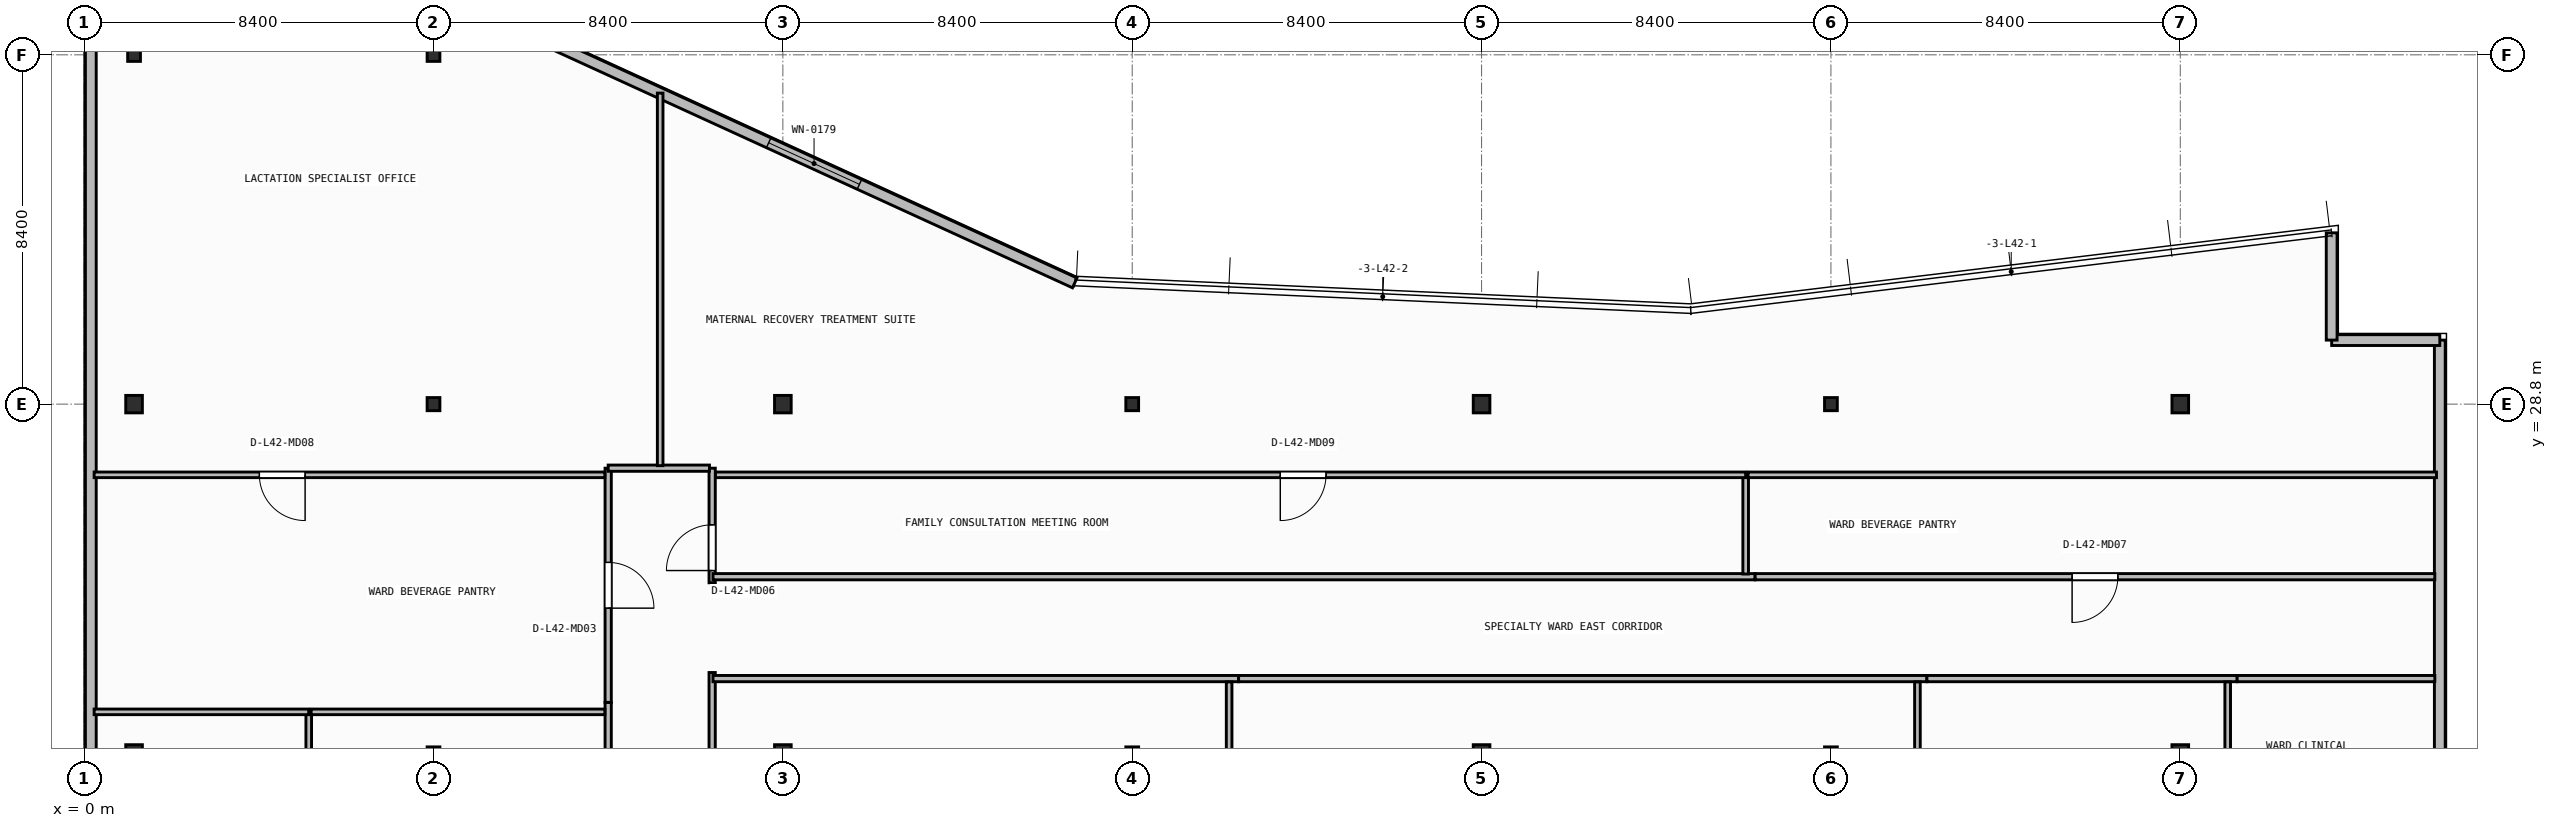
"""IFC4 building model, lengths in metres.
Left out: names, types, materials, properties, quantities, classifications, styles, units other than length and angle.
Written with IfcOpenShell. Run it as: python <this file> out.ifc"""

import sys

from ifc_helpers import new_model, si_unit, direction, frame, frame_2d, origin, origin_2d, place, context, subcontext, project, spatial, rectangle, i_section, extrude, element, fill, save


model = new_model("IFC4")
c1 = context("Model", 3, precision=1e-05, world=origin(), true_north=direction((0.0, 1.0)))
c2 = subcontext(c1, "Body", "Model", "MODEL_VIEW")
j1 = project(units=[si_unit("LENGTHUNIT", "METRE"), si_unit("PLANEANGLEUNIT", "RADIAN")], contexts=[c1])
p1 = place(None, origin())
s1 = spatial("IfcSite", under=j1, at=p1, CompositionType="ELEMENT")
p2 = place(p1, origin())
s2 = spatial("IfcBuilding", under=s1, at=p2, CompositionType="ELEMENT")
p3 = place(p2, frame((0.0, 0.0, 170.5)))
s3 = spatial("IfcBuildingStorey", under=s2, at=p3, CompositionType="ELEMENT", Elevation=170.5)
p4 = place(p3, frame((1.2, 20.4, 0.0), z_axis=(0.0, 0.0, 1.0), x_axis=(1.0, 0.0, 0.0)))
e1 = element("IfcColumn", 1, at=p4, inside=s3, PredefinedType="COLUMN", context=c2, shape_type="SweptSolid", body=[
    extrude(i_section(OverallWidth=0.4, OverallDepth=0.42, WebThickness=0.025, FlangeThickness=0.04, at=origin_2d()), origin(), (0.0, 0.0, 1.0), 3.95),
])
p5 = place(p3, frame((8.4, 20.4, 0.0), z_axis=(0.0, 0.0, 1.0), x_axis=(1.0, 0.0, 0.0)))
e2 = element("IfcColumn", 2, at=p5, inside=s3, PredefinedType="COLUMN", context=c2, shape_type="SweptSolid", body=[
    extrude(i_section(OverallWidth=0.307, OverallDepth=0.315, WebThickness=0.012, FlangeThickness=0.019, FilletRadius=0.017, at=origin_2d()), origin(), (0.0, 0.0, 1.0), 3.95),
])
p6 = place(p3, frame((16.8, 20.4, 0.0), z_axis=(0.0, 0.0, 1.0), x_axis=(1.0, 0.0, 0.0)))
e3 = element("IfcColumn", 3, at=p6, inside=s3, PredefinedType="COLUMN", context=c2, shape_type="SweptSolid", body=[
    extrude(i_section(OverallWidth=0.4, OverallDepth=0.42, WebThickness=0.025, FlangeThickness=0.04, at=origin_2d()), origin(), (0.0, 0.0, 1.0), 3.95),
])
p7 = place(p3, frame((25.2, 20.4, 0.0), z_axis=(0.0, 0.0, 1.0), x_axis=(1.0, 0.0, 0.0)))
e4 = element("IfcColumn", 4, at=p7, inside=s3, PredefinedType="COLUMN", context=c2, shape_type="SweptSolid", body=[
    extrude(i_section(OverallWidth=0.307, OverallDepth=0.315, WebThickness=0.012, FlangeThickness=0.019, FilletRadius=0.017, at=origin_2d()), origin(), (0.0, 0.0, 1.0), 3.95),
])
p8 = place(p3, frame((33.6, 20.4, 0.0), z_axis=(0.0, 0.0, 1.0), x_axis=(1.0, 0.0, 0.0)))
e5 = element("IfcColumn", 5, at=p8, inside=s3, PredefinedType="COLUMN", context=c2, shape_type="SweptSolid", body=[
    extrude(i_section(OverallWidth=0.4, OverallDepth=0.42, WebThickness=0.025, FlangeThickness=0.04, at=origin_2d()), origin(), (0.0, 0.0, 1.0), 3.95),
])
p9 = place(p3, frame((42.0, 20.4, 0.0), z_axis=(0.0, 0.0, 1.0), x_axis=(1.0, 0.0, 0.0)))
e6 = element("IfcColumn", 6, at=p9, inside=s3, PredefinedType="COLUMN", context=c2, shape_type="SweptSolid", body=[
    extrude(i_section(OverallWidth=0.307, OverallDepth=0.315, WebThickness=0.012, FlangeThickness=0.019, FilletRadius=0.017, at=origin_2d()), origin(), (0.0, 0.0, 1.0), 3.95),
])
for number, where, z_axis, x_axis in (
    (7, (50.4, 20.4, 0.0), (0.0, 0.0, 1.0), (1.0, 0.0, 0.0)),
    (8, (1.2, 28.8, 0.0), (0.0, 0.0, 1.0), (1.0, 0.0, 0.0)),
):
    element("IfcColumn", number, at=place(p3, frame(where, z_axis=z_axis, x_axis=x_axis)), inside=s3, PredefinedType="COLUMN", context=c2, shape_type="SweptSolid", body=[
        extrude(i_section(OverallWidth=0.4, OverallDepth=0.42, WebThickness=0.025, FlangeThickness=0.04, at=origin_2d()), origin(), (0.0, 0.0, 1.0), 3.95),
    ])
p10 = place(p3, frame((8.4, 28.8, 0.0), z_axis=(0.0, 0.0, 1.0), x_axis=(1.0, 0.0, 0.0)))
e9 = element("IfcColumn", 9, at=p10, inside=s3, PredefinedType="COLUMN", context=c2, shape_type="SweptSolid", body=[
    extrude(i_section(OverallWidth=0.307, OverallDepth=0.315, WebThickness=0.012, FlangeThickness=0.019, FilletRadius=0.017, at=origin_2d()), origin(), (0.0, 0.0, 1.0), 3.95),
])
p11 = place(p3, frame((16.8, 28.8, 0.0), z_axis=(0.0, 0.0, 1.0), x_axis=(1.0, 0.0, 0.0)))
e10 = element("IfcColumn", 10, at=p11, inside=s3, PredefinedType="COLUMN", context=c2, shape_type="SweptSolid", body=[
    extrude(i_section(OverallWidth=0.4, OverallDepth=0.42, WebThickness=0.025, FlangeThickness=0.04, at=origin_2d()), origin(), (0.0, 0.0, 1.0), 3.95),
])
p12 = place(p3, frame((25.2, 28.8, 0.0), z_axis=(0.0, 0.0, 1.0), x_axis=(1.0, 0.0, 0.0)))
e11 = element("IfcColumn", 11, at=p12, inside=s3, PredefinedType="COLUMN", context=c2, shape_type="SweptSolid", body=[
    extrude(i_section(OverallWidth=0.307, OverallDepth=0.315, WebThickness=0.012, FlangeThickness=0.019, FilletRadius=0.017, at=origin_2d()), origin(), (0.0, 0.0, 1.0), 3.95),
])
p13 = place(p3, frame((33.6, 28.8, 0.0), z_axis=(0.0, 0.0, 1.0), x_axis=(1.0, 0.0, 0.0)))
e12 = element("IfcColumn", 12, at=p13, inside=s3, PredefinedType="COLUMN", context=c2, shape_type="SweptSolid", body=[
    extrude(i_section(OverallWidth=0.4, OverallDepth=0.42, WebThickness=0.025, FlangeThickness=0.04, at=origin_2d()), origin(), (0.0, 0.0, 1.0), 3.95),
])
p14 = place(p3, frame((42.0, 28.8, 0.0), z_axis=(0.0, 0.0, 1.0), x_axis=(1.0, 0.0, 0.0)))
e13 = element("IfcColumn", 13, at=p14, inside=s3, PredefinedType="COLUMN", context=c2, shape_type="SweptSolid", body=[
    extrude(i_section(OverallWidth=0.307, OverallDepth=0.315, WebThickness=0.012, FlangeThickness=0.019, FilletRadius=0.017, at=origin_2d()), origin(), (0.0, 0.0, 1.0), 3.95),
])
p15 = place(p3, frame((50.4, 28.8, 0.0), z_axis=(0.0, 0.0, 1.0), x_axis=(1.0, 0.0, 0.0)))
e14 = element("IfcColumn", 14, at=p15, inside=s3, PredefinedType="COLUMN", context=c2, shape_type="SweptSolid", body=[
    extrude(i_section(OverallWidth=0.4, OverallDepth=0.42, WebThickness=0.025, FlangeThickness=0.04, at=origin_2d()), origin(), (0.0, 0.0, 1.0), 3.95),
])
for number, where, z_axis, x_axis in (
    (15, (1.2, 37.2, 0.0), (0.0, 0.0, 1.0), (1.0, 0.0, 0.0)),
    (16, (8.4, 37.2, 0.0), (0.0, 0.0, 1.0), (1.0, 0.0, 0.0)),
):
    element("IfcColumn", number, at=place(p3, frame(where, z_axis=z_axis, x_axis=x_axis)), inside=s3, PredefinedType="COLUMN", context=c2, shape_type="SweptSolid", body=[
        extrude(i_section(OverallWidth=0.307, OverallDepth=0.315, WebThickness=0.012, FlangeThickness=0.019, FilletRadius=0.017, at=origin_2d()), origin(), (0.0, 0.0, 1.0), 3.95),
    ])
p16 = place(p3, frame((56.64, 6.86, 0.0), z_axis=(0.0, 0.0, 1.0), x_axis=(0.0, 1.0, 0.0)))
e17 = element("IfcWall", 17, at=p16, inside=s3, PredefinedType="STANDARD", context=c2, shape_type="SweptSolid", body=[
    extrude(rectangle(XDim=23.48, YDim=0.26, at=frame_2d((11.74, 0.0))), origin(), (0.0, 0.0, 1.0), 3.67),
])
p17 = place(p16, frame((11.09, 0.0, 0.0)))
e18 = element("IfcOpeningElement", 18, at=p17, cuts=e17, PredefinedType="OPENING", context=c2, shape_type="SweptSolid", body=[
    extrude(rectangle(XDim=1.3, YDim=2.15, at=frame_2d((0.65, 1.075))), frame((0.0, 0.14, 0.0), z_axis=(0.0, -1.0, 0.0), x_axis=(1.0, 0.0, 0.0)), (0.0, 0.0, 1.0), 0.28),
])
p18 = place(p3, frame((56.64, 30.34, 0.0), z_axis=(0.0, 0.0, 1.0), x_axis=(-1.0, 0.0, 0.0)))
e19 = element("IfcWall", 19, at=p18, inside=s3, PredefinedType="STANDARD", context=c2, shape_type="SweptSolid", body=[
    extrude(rectangle(XDim=2.6, YDim=0.26, at=frame_2d((1.3, 0.0))), origin(), (0.0, 0.0, 1.0), 3.67),
])
p19 = place(p3, frame((54.04, 30.34, 0.0), z_axis=(0.0, 0.0, 1.0), x_axis=(0.0, 1.0, 0.0)))
e20 = element("IfcWall", 20, at=p19, inside=s3, PredefinedType="STANDARD", context=c2, shape_type="SweptSolid", body=[
    extrude(rectangle(XDim=2.579, YDim=0.26, at=frame_2d((1.29, 0.0))), origin(), (0.0, 0.0, 1.0), 3.67),
])
p20 = place(p3, frame((23.818, 31.716, 0.0), z_axis=(0.0, 0.0, 1.0), x_axis=(-0.909209527513, 0.416338846471, 0.0)))
e21 = element("IfcWall", 21, at=p20, inside=s3, PredefinedType="STANDARD", context=c2, shape_type="SweptSolid", body=[
    extrude(rectangle(XDim=13.787, YDim=0.26, at=frame_2d((6.894, 0.0))), origin(), (0.0, 0.0, 1.0), 3.67),
])
p21 = place(p20, frame((5.694, 0.0, 0.9)))
e22 = element("IfcOpeningElement", 22, at=p21, cuts=e21, PredefinedType="OPENING", context=c2, shape_type="SweptSolid", body=[
    extrude(rectangle(XDim=2.4, YDim=1.65, at=frame_2d((1.2, 0.825))), frame((0.0, 0.14, 0.0), z_axis=(0.0, -1.0, 0.0), x_axis=(1.0, 0.0, 0.0)), (0.0, 0.0, 1.0), 0.28),
])
p22 = place(p3, frame((0.16, 40.64, 0.0), z_axis=(0.0, 0.0, 1.0), x_axis=(0.0, -1.0, 0.0)))
e23 = element("IfcWall", 23, at=p22, inside=s3, PredefinedType="STANDARD", context=c2, shape_type="SweptSolid", body=[
    extrude(rectangle(XDim=37.88, YDim=0.26, at=frame_2d((18.94, 0.0))), origin(), (0.0, 0.0, 1.0), 3.67),
])
p23 = place(p22, frame((27.37, 0.0, 0.9)))
e24 = element("IfcOpeningElement", 24, at=p23, cuts=e23, PredefinedType="OPENING", context=c2, shape_type="SweptSolid", body=[
    extrude(rectangle(XDim=2.4, YDim=1.65, at=frame_2d((1.2, 0.825))), frame((0.0, 0.14, 0.0), z_axis=(0.0, -1.0, 0.0), x_axis=(1.0, 0.0, 0.0)), (0.0, 0.0, 1.0), 0.28),
])
p24 = place(p3, frame((12.6, 21.626, 0.0), z_axis=(0.0, 0.0, 1.0), x_axis=(0.0, -1.0, 0.0)))
e25 = element("IfcWall", 25, at=p24, inside=s3, PredefinedType="PARTITIONING", context=c2, shape_type="SweptSolid", body=[
    extrude(rectangle(XDim=6.926, YDim=0.15, at=frame_2d((3.463, 0.0))), origin(), (0.0, 0.0, 1.0), 3.67),
])
p25 = place(p3, frame((12.6, 27.26, 0.0), z_axis=(0.0, 0.0, 1.0), x_axis=(0.0, -1.0, 0.0)))
e26 = element("IfcWall", 26, at=p25, inside=s3, PredefinedType="PARTITIONING", context=c2, shape_type="SweptSolid", body=[
    extrude(rectangle(XDim=5.632, YDim=0.15, at=frame_2d((2.816, 0.0))), origin(), (0.0, 0.0, 1.0), 3.67),
])
p26 = place(p25, frame((2.266, 0.0, 0.0)))
e27 = element("IfcOpeningElement", 27, at=p26, cuts=e26, PredefinedType="OPENING", context=c2, shape_type="SweptSolid", body=[
    extrude(rectangle(XDim=1.1, YDim=2.1, at=frame_2d((0.55, 1.05))), frame((0.0, 0.085, 0.0), z_axis=(0.0, -1.0, 0.0), x_axis=(1.0, 0.0, 0.0)), (0.0, 0.0, 1.0), 0.17),
])
p27 = place(p3, frame((15.1, 14.7, 0.0), z_axis=(0.0, 0.0, 1.0), x_axis=(0.0, 1.0, 0.0)))
e28 = element("IfcWall", 28, at=p27, inside=s3, PredefinedType="PARTITIONING", context=c2, shape_type="SweptSolid", body=[
    extrude(rectangle(XDim=7.646, YDim=0.15, at=frame_2d((3.823, 0.0))), origin(), (0.0, 0.0, 1.0), 3.67),
])
p28 = place(p3, frame((15.1, 24.504, 0.0), z_axis=(0.0, 0.0, 1.0), x_axis=(0.0, 1.0, 0.0)))
e29 = element("IfcWall", 29, at=p28, inside=s3, PredefinedType="PARTITIONING", context=c2, shape_type="SweptSolid", body=[
    extrude(rectangle(XDim=2.756, YDim=0.15, at=frame_2d((1.378, 0.0))), origin(), (0.0, 0.0, 1.0), 3.67),
])
p29 = place(p28, frame((0.294, 0.0, 0.0)))
e30 = element("IfcOpeningElement", 30, at=p29, cuts=e29, PredefinedType="OPENING", context=c2, shape_type="SweptSolid", body=[
    extrude(rectangle(XDim=1.1, YDim=2.1, at=frame_2d((0.55, 1.05))), frame((0.0, 0.085, 0.0), z_axis=(0.0, -1.0, 0.0), x_axis=(1.0, 0.0, 0.0)), (0.0, 0.0, 1.0), 0.17),
])
p30 = place(p3, frame((15.035, 27.26, 0.0), z_axis=(0.0, 0.0, 1.0), x_axis=(-1.0, 0.0, 0.0)))
e31 = element("IfcWall", 31, at=p30, inside=s3, PredefinedType="PARTITIONING", context=c2, shape_type="SweptSolid", body=[
    extrude(rectangle(XDim=2.435, YDim=0.15, at=frame_2d((1.217, 0.0))), origin(), (0.0, 0.0, 1.0), 3.67),
])
p31 = place(p3, frame((15.12, 22.2, 0.0), z_axis=(0.0, 0.0, 1.0), x_axis=(1.0, 0.0, 0.0)))
e32 = element("IfcWall", 32, at=p31, inside=s3, PredefinedType="PARTITIONING", context=c2, shape_type="SweptSolid", body=[
    extrude(rectangle(XDim=12.636, YDim=0.15, at=frame_2d((6.318, 0.0))), origin(), (0.0, 0.0, 1.0), 3.67),
])
p32 = place(p3, frame((27.758, 22.2, 0.0), z_axis=(0.0, 0.0, 1.0), x_axis=(1.0, 0.0, 0.0)))
e33 = element("IfcWall", 33, at=p32, inside=s3, PredefinedType="PARTITIONING", context=c2, shape_type="SweptSolid", body=[
    extrude(rectangle(XDim=16.548, YDim=0.15, at=frame_2d((8.274, 0.0))), origin(), (0.0, 0.0, 1.0), 3.67),
])
p33 = place(p3, frame((44.308, 22.2, 0.0), z_axis=(0.0, 0.0, 1.0), x_axis=(1.0, 0.0, 0.0)))
e34 = element("IfcWall", 34, at=p33, inside=s3, PredefinedType="PARTITIONING", context=c2, shape_type="SweptSolid", body=[
    extrude(rectangle(XDim=7.458, YDim=0.15, at=frame_2d((3.729, 0.0))), origin(), (0.0, 0.0, 1.0), 3.67),
])
p34 = place(p3, frame((51.768, 22.2, 0.0), z_axis=(0.0, 0.0, 1.0), x_axis=(1.0, 0.0, 0.0)))
e35 = element("IfcWall", 35, at=p34, inside=s3, PredefinedType="PARTITIONING", context=c2, shape_type="SweptSolid", body=[
    extrude(rectangle(XDim=4.752, YDim=0.15, at=frame_2d((2.376, 0.0))), origin(), (0.0, 0.0, 1.0), 3.67),
])
p35 = place(p3, frame((40.176, 24.65, 0.0), z_axis=(0.0, 0.0, 1.0), x_axis=(-1.0, 0.0, 0.0)))
e36 = element("IfcWall", 36, at=p35, inside=s3, PredefinedType="PARTITIONING", context=c2, shape_type="SweptSolid", body=[
    extrude(rectangle(XDim=25.056, YDim=0.15, at=frame_2d((12.528, 0.0))), origin(), (0.0, 0.0, 1.0), 3.289),
])
p36 = place(p3, frame((56.52, 24.65, 0.0), z_axis=(0.0, 0.0, 1.0), x_axis=(-1.0, 0.0, 0.0)))
e37 = element("IfcWall", 37, at=p36, inside=s3, PredefinedType="PARTITIONING", context=c2, shape_type="SweptSolid", body=[
    extrude(rectangle(XDim=16.342, YDim=0.15, at=frame_2d((8.171, 0.0))), origin(), (0.0, 0.0, 1.0), 3.289),
])
p37 = place(p36, frame((7.621, 0.0, 0.0)))
e38 = element("IfcOpeningElement", 38, at=p37, cuts=e37, PredefinedType="OPENING", context=c2, shape_type="SweptSolid", body=[
    extrude(rectangle(XDim=1.1, YDim=2.1, at=frame_2d((0.55, 1.05))), frame((0.0, 0.085, 0.0), z_axis=(0.0, -1.0, 0.0), x_axis=(1.0, 0.0, 0.0)), (0.0, 0.0, 1.0), 0.17),
])
p38 = place(p3, frame((5.4, 17.14, 0.0), z_axis=(0.0, 0.0, 1.0), x_axis=(0.0, 1.0, 0.0)))
e39 = element("IfcWall", 39, at=p38, inside=s3, PredefinedType="PARTITIONING", context=c2, shape_type="SweptSolid", body=[
    extrude(rectangle(XDim=4.26, YDim=0.135, at=frame_2d((2.13, 0.0))), origin(), (0.0, 0.0, 1.0), 3.67),
])
p39 = place(p3, frame((5.4, 21.4, 0.0), z_axis=(0.0, 0.0, 1.0), x_axis=(-1.0, 0.0, 0.0)))
e40 = element("IfcWall", 40, at=p39, inside=s3, PredefinedType="PARTITIONING", context=c2, shape_type="SweptSolid", body=[
    extrude(rectangle(XDim=5.16, YDim=0.135, at=frame_2d((2.58, 0.0))), origin(), (0.0, 0.0, 1.0), 3.67),
])
p40 = place(p3, frame((12.52, 21.4, 0.0), z_axis=(0.0, 0.0, 1.0), x_axis=(-1.0, 0.0, 0.0)))
e41 = element("IfcWall", 41, at=p40, inside=s3, PredefinedType="PARTITIONING", context=c2, shape_type="SweptSolid", body=[
    extrude(rectangle(XDim=7.062, YDim=0.135, at=frame_2d((3.531, 0.0))), origin(), (0.0, 0.0, 1.0), 3.67),
])
p41 = place(p3, frame((12.52, 27.1, 0.0), z_axis=(0.0, 0.0, 1.0), x_axis=(-1.0, 0.0, 0.0)))
e42 = element("IfcWall", 42, at=p41, inside=s3, PredefinedType="PARTITIONING", context=c2, shape_type="SweptSolid", body=[
    extrude(rectangle(XDim=12.28, YDim=0.135, at=frame_2d((6.14, 0.0))), origin(), (0.0, 0.0, 1.0), 3.67),
])
p42 = place(p41, frame((7.207, 0.0, 0.0)))
e43 = element("IfcOpeningElement", 43, at=p42, cuts=e42, PredefinedType="OPENING", context=c2, shape_type="SweptSolid", body=[
    extrude(rectangle(XDim=1.1, YDim=2.1, at=frame_2d((0.55, 1.05))), frame((0.0, 0.077, 0.0), z_axis=(0.0, -1.0, 0.0), x_axis=(1.0, 0.0, 0.0)), (0.0, 0.0, 1.0), 0.155),
])
for number, where, z_axis, x_axis in (
    (44, (27.53, 14.76, 0.0), (0.0, 0.0, 1.0), (0.0, 1.0, 0.0)),
    (45, (44.08, 14.76, 0.0), (0.0, 0.0, 1.0), (0.0, 1.0, 0.0)),
    (46, (51.54, 14.76, 0.0), (0.0, 0.0, 1.0), (0.0, 1.0, 0.0)),
):
    element("IfcWall", number, at=place(p3, frame(where, z_axis=z_axis, x_axis=x_axis)), inside=s3, PredefinedType="PARTITIONING", context=c2, shape_type="SweptSolid", body=[
        extrude(rectangle(XDim=7.36, YDim=0.135, at=frame_2d((3.68, 0.0))), origin(), (0.0, 0.0, 1.0), 3.67),
    ])
p43 = place(p3, frame((39.95, 24.715, 0.0), z_axis=(0.0, 0.0, 1.0), x_axis=(0.0, 1.0, 0.0)))
e47 = element("IfcWall", 47, at=p43, inside=s3, PredefinedType="PARTITIONING", context=c2, shape_type="SweptSolid", body=[
    extrude(rectangle(XDim=2.385, YDim=0.135, at=frame_2d((1.192, 0.0))), origin(), (0.0, 0.0, 1.0), 3.67),
])
p44 = place(p3, frame((39.95, 27.1, 0.0), z_axis=(0.0, 0.0, 1.0), x_axis=(-1.0, 0.0, 0.0)))
e48 = element("IfcWall", 48, at=p44, inside=s3, PredefinedType="PARTITIONING", context=c2, shape_type="SweptSolid", body=[
    extrude(rectangle(XDim=24.77, YDim=0.135, at=frame_2d((12.385, 0.0))), origin(), (0.0, 0.0, 1.0), 3.67),
])
p45 = place(p44, frame((10.09, 0.0, 0.0)))
e49 = element("IfcOpeningElement", 49, at=p45, cuts=e48, PredefinedType="OPENING", context=c2, shape_type="SweptSolid", body=[
    extrude(rectangle(XDim=1.1, YDim=2.1, at=frame_2d((0.55, 1.05))), frame((0.0, 0.077, 0.0), z_axis=(0.0, -1.0, 0.0), x_axis=(1.0, 0.0, 0.0)), (0.0, 0.0, 1.0), 0.155),
])
p46 = place(p3, frame((56.56, 27.1, 0.0), z_axis=(0.0, 0.0, 1.0), x_axis=(-1.0, 0.0, 0.0)))
e50 = element("IfcWall", 50, at=p46, inside=s3, PredefinedType="PARTITIONING", context=c2, shape_type="SweptSolid", body=[
    extrude(rectangle(XDim=16.552, YDim=0.135, at=frame_2d((8.276, 0.0))), origin(), (0.0, 0.0, 1.0), 3.67),
])
p47 = place(p3, frame((13.85, 27.32, 0.0), z_axis=(0.0, 0.0, 1.0), x_axis=(0.0, 1.0, 0.0)))
e51 = element("IfcWall", 51, at=p47, inside=s3, PredefinedType="PARTITIONING", context=c2, shape_type="SweptSolid", body=[
    extrude(rectangle(XDim=8.96, YDim=0.135, at=frame_2d((4.48, 0.0))), origin(), (0.0, 0.0, 1.0), 3.67),
])
p48 = place(p21, origin())
e52 = element("IfcWindow", 52, at=p48, inside=s3, PartitioningType="SINGLE_PANEL", PredefinedType="WINDOW", context=c2, shape_type="SweptSolid", body=[
    extrude(rectangle(XDim=2.4, YDim=1.65, at=frame_2d((1.2, 0.825))), frame((0.0, 0.03, 0.0), z_axis=(0.0, -1.0, 0.0), x_axis=(1.0, 0.0, 0.0)), (0.0, 0.0, 1.0), 0.06),
])
fill(e22, e52)
p49 = place(p26, origin())
e53 = element("IfcDoor", 53, at=p49, inside=s3, OperationType="SINGLE_SWING_RIGHT", PredefinedType="DOOR", context=c2, shape_type="SweptSolid", body=[
    extrude(rectangle(XDim=1.1, YDim=2.1, at=frame_2d((0.55, 1.05))), frame((0.0, 0.025, 0.0), z_axis=(0.0, -1.0, 0.0), x_axis=(1.0, 0.0, 0.0)), (0.0, 0.0, 1.0), 0.05),
])
fill(e27, e53)
p50 = place(p29, origin())
e54 = element("IfcDoor", 54, at=p50, inside=s3, OperationType="SINGLE_SWING_LEFT", PredefinedType="DOOR", context=c2, shape_type="SweptSolid", body=[
    extrude(rectangle(XDim=1.1, YDim=2.1, at=frame_2d((0.55, 1.05))), frame((0.0, 0.025, 0.0), z_axis=(0.0, -1.0, 0.0), x_axis=(1.0, 0.0, 0.0)), (0.0, 0.0, 1.0), 0.05),
])
fill(e30, e54)
p51 = place(p37, origin())
e55 = element("IfcDoor", 55, at=p51, inside=s3, OperationType="SINGLE_SWING_RIGHT", PredefinedType="DOOR", context=c2, shape_type="SweptSolid", body=[
    extrude(rectangle(XDim=1.1, YDim=2.1, at=frame_2d((0.55, 1.05))), frame((0.0, 0.025, 0.0), z_axis=(0.0, -1.0, 0.0), x_axis=(1.0, 0.0, 0.0)), (0.0, 0.0, 1.0), 0.05),
])
fill(e38, e55)
p52 = place(p42, origin())
e56 = element("IfcDoor", 56, at=p52, inside=s3, OperationType="SINGLE_SWING_LEFT", PredefinedType="DOOR", context=c2, shape_type="SweptSolid", body=[
    extrude(rectangle(XDim=1.1, YDim=2.1, at=frame_2d((0.55, 1.05))), frame((0.0, 0.025, 0.0), z_axis=(0.0, -1.0, 0.0), x_axis=(1.0, 0.0, 0.0)), (0.0, 0.0, 1.0), 0.05),
])
fill(e43, e56)
p53 = place(p45, origin())
e57 = element("IfcDoor", 57, at=p53, inside=s3, OperationType="SINGLE_SWING_RIGHT", PredefinedType="DOOR", context=c2, shape_type="SweptSolid", body=[
    extrude(rectangle(XDim=1.1, YDim=2.1, at=frame_2d((0.55, 1.05))), frame((0.0, 0.025, 0.0), z_axis=(0.0, -1.0, 0.0), x_axis=(1.0, 0.0, 0.0)), (0.0, 0.0, 1.0), 0.05),
])
fill(e49, e57)
save(model, sys.argv[1])
